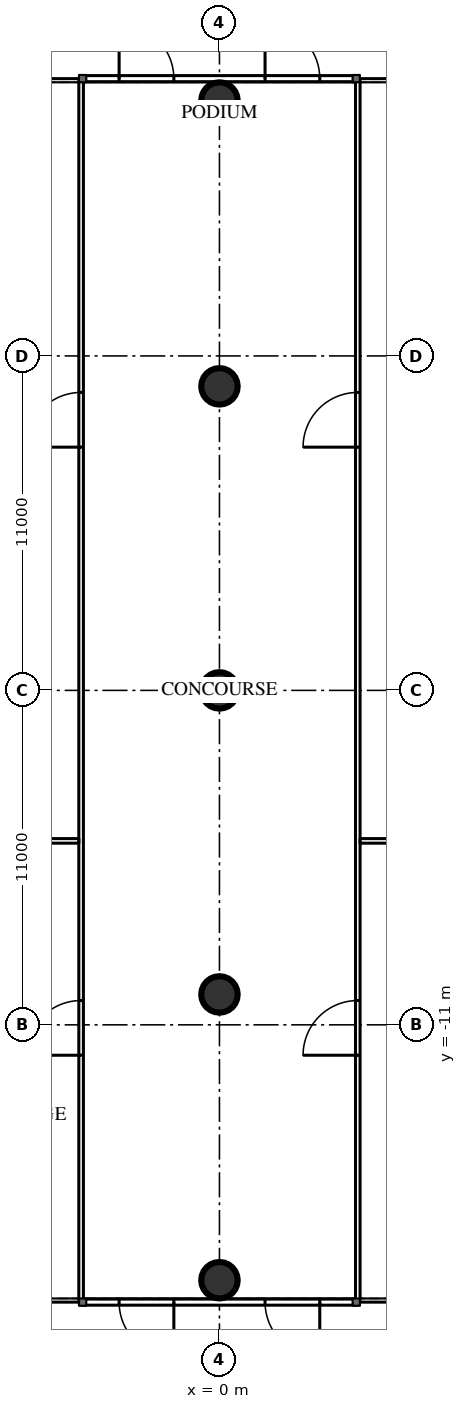
"""IFC4 building model, lengths in metres.
Left out: names, types, materials, properties, quantities, classifications, styles, units other than length and angle.
Written with IfcOpenShell. Run it as: python <this file> out.ifc"""

import sys

from ifc_helpers import new_model, si_unit, direction, frame, frame_2d, origin, origin_2d, place, context, subcontext, project, spatial, rectangle, circle, extrude, element, fill, save


model = new_model("IFC4")
c1 = context("Model", 3, precision=1e-05, world=origin(), true_north=direction((0.0, 1.0)))
c2 = subcontext(c1, "Body", "Model", "MODEL_VIEW")
j1 = project(units=[si_unit("LENGTHUNIT", "METRE"), si_unit("PLANEANGLEUNIT", "RADIAN")], contexts=[c1])
p1 = place(None, origin())
s1 = spatial("IfcSite", under=j1, at=p1, CompositionType="ELEMENT")
p2 = place(p1, origin())
s2 = spatial("IfcBuilding", under=s1, at=p2, CompositionType="ELEMENT")
p3 = place(p2, origin())
s3 = spatial("IfcBuildingStorey", under=s2, at=p3, CompositionType="ELEMENT", Elevation=0.0)
for number, where, z_axis, x_axis in (
    (1, (0.0, -19.4, 0.0), (0.0, 0.0, 1.0), (1.0, 0.0, 0.0)),
    (2, (0.0, -10.0, 0.0), (0.0, 0.0, 1.0), (1.0, 0.0, 0.0)),
    (3, (0.0, 0.0, 0.0), (0.0, 0.0, 1.0), (1.0, 0.0, 0.0)),
    (4, (0.0, 10.0, 0.0), (0.0, 0.0, 1.0), (1.0, 0.0, 0.0)),
    (5, (0.0, 19.4, 0.0), (0.0, 0.0, 1.0), (1.0, 0.0, 0.0)),
):
    element("IfcColumn", number, at=place(p3, frame(where, z_axis=z_axis, x_axis=x_axis)), inside=s3, PredefinedType="COLUMN", context=c2, shape_type="SweptSolid", body=[
        extrude(circle(Radius=0.6, at=origin_2d()), origin(), (0.0, 0.0, 1.0), 7.2),
    ])
p4 = place(p3, frame((4.5, -20.12, 0.0), z_axis=(0.0, 0.0, 1.0), x_axis=(-1.0, 0.0, 0.0)))
e6 = element("IfcWall", 6, at=p4, inside=s3, PredefinedType="STANDARD", context=c2, shape_type="SweptSolid", body=[
    extrude(rectangle(XDim=9.0, YDim=0.2, at=frame_2d((4.5, 0.0))), origin(), (0.0, 0.0, 1.0), 6.85),
])
p5 = place(p4, frame((6.0, 0.0, 0.0)))
e7 = element("IfcOpeningElement", 7, at=p5, cuts=e6, PredefinedType="OPENING", context=c2, shape_type="SweptSolid", body=[
    extrude(rectangle(XDim=1.8, YDim=2.4, at=frame_2d((0.9, 1.2))), frame((0.0, 0.11, 0.0), z_axis=(0.0, -1.0, 0.0), x_axis=(1.0, 0.0, 0.0)), (0.0, 0.0, 1.0), 0.22),
])
p6 = place(p4, frame((1.2, 0.0, 0.0)))
e8 = element("IfcOpeningElement", 8, at=p6, cuts=e6, PredefinedType="OPENING", context=c2, shape_type="SweptSolid", body=[
    extrude(rectangle(XDim=1.8, YDim=2.4, at=frame_2d((0.9, 1.2))), frame((0.0, 0.11, 0.0), z_axis=(0.0, -1.0, 0.0), x_axis=(1.0, 0.0, 0.0)), (0.0, 0.0, 1.0), 0.22),
])
p7 = place(p3, frame((-4.5, 20.12, 0.0), z_axis=(0.0, 0.0, 1.0), x_axis=(1.0, 0.0, 0.0)))
e9 = element("IfcWall", 9, at=p7, inside=s3, PredefinedType="STANDARD", context=c2, shape_type="SweptSolid", body=[
    extrude(rectangle(XDim=9.0, YDim=0.2, at=frame_2d((4.5, 0.0))), origin(), (0.0, 0.0, 1.0), 6.85),
])
p8 = place(p7, frame((6.0, 0.0, 0.0)))
e10 = element("IfcOpeningElement", 10, at=p8, cuts=e9, PredefinedType="OPENING", context=c2, shape_type="SweptSolid", body=[
    extrude(rectangle(XDim=1.8, YDim=2.4, at=frame_2d((0.9, 1.2))), frame((0.0, 0.11, 0.0), z_axis=(0.0, -1.0, 0.0), x_axis=(1.0, 0.0, 0.0)), (0.0, 0.0, 1.0), 0.22),
])
p9 = place(p7, frame((1.2, 0.0, 0.0)))
e11 = element("IfcOpeningElement", 11, at=p9, cuts=e9, PredefinedType="OPENING", context=c2, shape_type="SweptSolid", body=[
    extrude(rectangle(XDim=1.8, YDim=2.4, at=frame_2d((0.9, 1.2))), frame((0.0, 0.11, 0.0), z_axis=(0.0, -1.0, 0.0), x_axis=(1.0, 0.0, 0.0)), (0.0, 0.0, 1.0), 0.22),
])
p10 = place(p3, frame((-4.55, -20.06, 0.0), z_axis=(0.0, 0.0, 1.0), x_axis=(0.0, 1.0, 0.0)))
e12 = element("IfcWall", 12, at=p10, inside=s3, PredefinedType="PARTITIONING", context=c2, shape_type="SweptSolid", body=[
    extrude(rectangle(XDim=40.12, YDim=0.15, at=frame_2d((20.06, 0.0))), origin(), (0.0, 0.0, 1.0), 5.85),
])
p11 = place(p10, frame((8.06, 0.0, 0.0)))
e13 = element("IfcOpeningElement", 13, at=p11, cuts=e12, PredefinedType="OPENING", context=c2, shape_type="SweptSolid", body=[
    extrude(rectangle(XDim=1.8, YDim=2.2, at=frame_2d((0.9, 1.1))), frame((0.0, 0.085, 0.0), z_axis=(0.0, -1.0, 0.0), x_axis=(1.0, 0.0, 0.0)), (0.0, 0.0, 1.0), 0.17),
])
p12 = place(p10, frame((28.06, 0.0, 0.0)))
e14 = element("IfcOpeningElement", 14, at=p12, cuts=e12, PredefinedType="OPENING", context=c2, shape_type="SweptSolid", body=[
    extrude(rectangle(XDim=1.8, YDim=2.2, at=frame_2d((0.9, 1.1))), frame((0.0, 0.085, 0.0), z_axis=(0.0, -1.0, 0.0), x_axis=(1.0, 0.0, 0.0)), (0.0, 0.0, 1.0), 0.17),
])
p13 = place(p3, frame((4.55, -20.06, 0.0), z_axis=(0.0, 0.0, 1.0), x_axis=(0.0, 1.0, 0.0)))
e15 = element("IfcWall", 15, at=p13, inside=s3, PredefinedType="PARTITIONING", context=c2, shape_type="SweptSolid", body=[
    extrude(rectangle(XDim=40.12, YDim=0.15, at=frame_2d((20.06, 0.0))), origin(), (0.0, 0.0, 1.0), 5.85),
])
p14 = place(p13, frame((8.06, 0.0, 0.0)))
e16 = element("IfcOpeningElement", 16, at=p14, cuts=e15, PredefinedType="OPENING", context=c2, shape_type="SweptSolid", body=[
    extrude(rectangle(XDim=1.8, YDim=2.2, at=frame_2d((0.9, 1.1))), frame((0.0, 0.085, 0.0), z_axis=(0.0, -1.0, 0.0), x_axis=(1.0, 0.0, 0.0)), (0.0, 0.0, 1.0), 0.17),
])
p15 = place(p13, frame((28.06, 0.0, 0.0)))
e17 = element("IfcOpeningElement", 17, at=p15, cuts=e15, PredefinedType="OPENING", context=c2, shape_type="SweptSolid", body=[
    extrude(rectangle(XDim=1.8, YDim=2.2, at=frame_2d((0.9, 1.1))), frame((0.0, 0.085, 0.0), z_axis=(0.0, -1.0, 0.0), x_axis=(1.0, 0.0, 0.0)), (0.0, 0.0, 1.0), 0.17),
])
p16 = place(p3, frame((-27.5, -4.95, 0.0), z_axis=(0.0, 0.0, 1.0), x_axis=(1.0, 0.0, 0.0)))
e18 = element("IfcWall", 18, at=p16, inside=s3, PredefinedType="PARTITIONING", context=c2, shape_type="SweptSolid", body=[
    extrude(rectangle(XDim=22.875, YDim=0.15, at=frame_2d((11.438, 0.0))), origin(), (0.0, 0.0, 1.0), 5.85),
])
p17 = place(p16, frame((9.1, 0.0, 0.0)))
e19 = element("IfcOpeningElement", 19, at=p17, cuts=e18, PredefinedType="OPENING", context=c2, shape_type="SweptSolid", body=[
    extrude(rectangle(XDim=1.8, YDim=2.2, at=frame_2d((0.9, 1.1))), frame((0.0, 0.085, 0.0), z_axis=(0.0, -1.0, 0.0), x_axis=(1.0, 0.0, 0.0)), (0.0, 0.0, 1.0), 0.17),
])
p18 = place(p3, frame((4.625, -4.95, 0.0), z_axis=(0.0, 0.0, 1.0), x_axis=(1.0, 0.0, 0.0)))
e20 = element("IfcWall", 20, at=p18, inside=s3, PredefinedType="PARTITIONING", context=c2, shape_type="SweptSolid", body=[
    extrude(rectangle(XDim=22.875, YDim=0.15, at=frame_2d((11.438, 0.0))), origin(), (0.0, 0.0, 1.0), 5.85),
])
p19 = place(p18, frame((9.0, 0.0, 0.0)))
e21 = element("IfcOpeningElement", 21, at=p19, cuts=e20, PredefinedType="OPENING", context=c2, shape_type="SweptSolid", body=[
    extrude(rectangle(XDim=1.8, YDim=2.2, at=frame_2d((0.9, 1.1))), frame((0.0, 0.085, 0.0), z_axis=(0.0, -1.0, 0.0), x_axis=(1.0, 0.0, 0.0)), (0.0, 0.0, 1.0), 0.17),
])
p20 = place(p5, origin())
e22 = element("IfcDoor", 22, at=p20, inside=s3, OperationType="SINGLE_SWING_LEFT", PredefinedType="DOOR", context=c2, shape_type="SweptSolid", body=[
    extrude(rectangle(XDim=1.8, YDim=2.4, at=frame_2d((0.9, 1.2))), frame((0.0, 0.025, 0.0), z_axis=(0.0, -1.0, 0.0), x_axis=(1.0, 0.0, 0.0)), (0.0, 0.0, 1.0), 0.05),
])
fill(e7, e22)
p21 = place(p6, origin())
e23 = element("IfcDoor", 23, at=p21, inside=s3, OperationType="SINGLE_SWING_LEFT", PredefinedType="DOOR", context=c2, shape_type="SweptSolid", body=[
    extrude(rectangle(XDim=1.8, YDim=2.4, at=frame_2d((0.9, 1.2))), frame((0.0, 0.025, 0.0), z_axis=(0.0, -1.0, 0.0), x_axis=(1.0, 0.0, 0.0)), (0.0, 0.0, 1.0), 0.05),
])
fill(e8, e23)
p22 = place(p8, origin())
e24 = element("IfcDoor", 24, at=p22, inside=s3, OperationType="SINGLE_SWING_LEFT", PredefinedType="DOOR", context=c2, shape_type="SweptSolid", body=[
    extrude(rectangle(XDim=1.8, YDim=2.4, at=frame_2d((0.9, 1.2))), frame((0.0, 0.025, 0.0), z_axis=(0.0, -1.0, 0.0), x_axis=(1.0, 0.0, 0.0)), (0.0, 0.0, 1.0), 0.05),
])
fill(e10, e24)
p23 = place(p9, origin())
e25 = element("IfcDoor", 25, at=p23, inside=s3, OperationType="SINGLE_SWING_LEFT", PredefinedType="DOOR", context=c2, shape_type="SweptSolid", body=[
    extrude(rectangle(XDim=1.8, YDim=2.4, at=frame_2d((0.9, 1.2))), frame((0.0, 0.025, 0.0), z_axis=(0.0, -1.0, 0.0), x_axis=(1.0, 0.0, 0.0)), (0.0, 0.0, 1.0), 0.05),
])
fill(e11, e25)
p24 = place(p11, origin())
e26 = element("IfcDoor", 26, at=p24, inside=s3, OperationType="DOUBLE_DOOR_SINGLE_SWING", PredefinedType="DOOR", context=c2, shape_type="SweptSolid", body=[
    extrude(rectangle(XDim=1.8, YDim=2.2, at=frame_2d((0.9, 1.1))), frame((0.0, 0.025, 0.0), z_axis=(0.0, -1.0, 0.0), x_axis=(1.0, 0.0, 0.0)), (0.0, 0.0, 1.0), 0.05),
])
fill(e13, e26)
p25 = place(p12, origin())
e27 = element("IfcDoor", 27, at=p25, inside=s3, OperationType="DOUBLE_DOOR_SINGLE_SWING", PredefinedType="DOOR", context=c2, shape_type="SweptSolid", body=[
    extrude(rectangle(XDim=1.8, YDim=2.2, at=frame_2d((0.9, 1.1))), frame((0.0, 0.025, 0.0), z_axis=(0.0, -1.0, 0.0), x_axis=(1.0, 0.0, 0.0)), (0.0, 0.0, 1.0), 0.05),
])
fill(e14, e27)
p26 = place(p14, origin())
e28 = element("IfcDoor", 28, at=p26, inside=s3, OperationType="DOUBLE_DOOR_SINGLE_SWING", PredefinedType="DOOR", context=c2, shape_type="SweptSolid", body=[
    extrude(rectangle(XDim=1.8, YDim=2.2, at=frame_2d((0.9, 1.1))), frame((0.0, 0.025, 0.0), z_axis=(0.0, -1.0, 0.0), x_axis=(1.0, 0.0, 0.0)), (0.0, 0.0, 1.0), 0.05),
])
fill(e16, e28)
p27 = place(p15, origin())
e29 = element("IfcDoor", 29, at=p27, inside=s3, OperationType="DOUBLE_DOOR_SINGLE_SWING", PredefinedType="DOOR", context=c2, shape_type="SweptSolid", body=[
    extrude(rectangle(XDim=1.8, YDim=2.2, at=frame_2d((0.9, 1.1))), frame((0.0, 0.025, 0.0), z_axis=(0.0, -1.0, 0.0), x_axis=(1.0, 0.0, 0.0)), (0.0, 0.0, 1.0), 0.05),
])
fill(e17, e29)
save(model, sys.argv[1])
